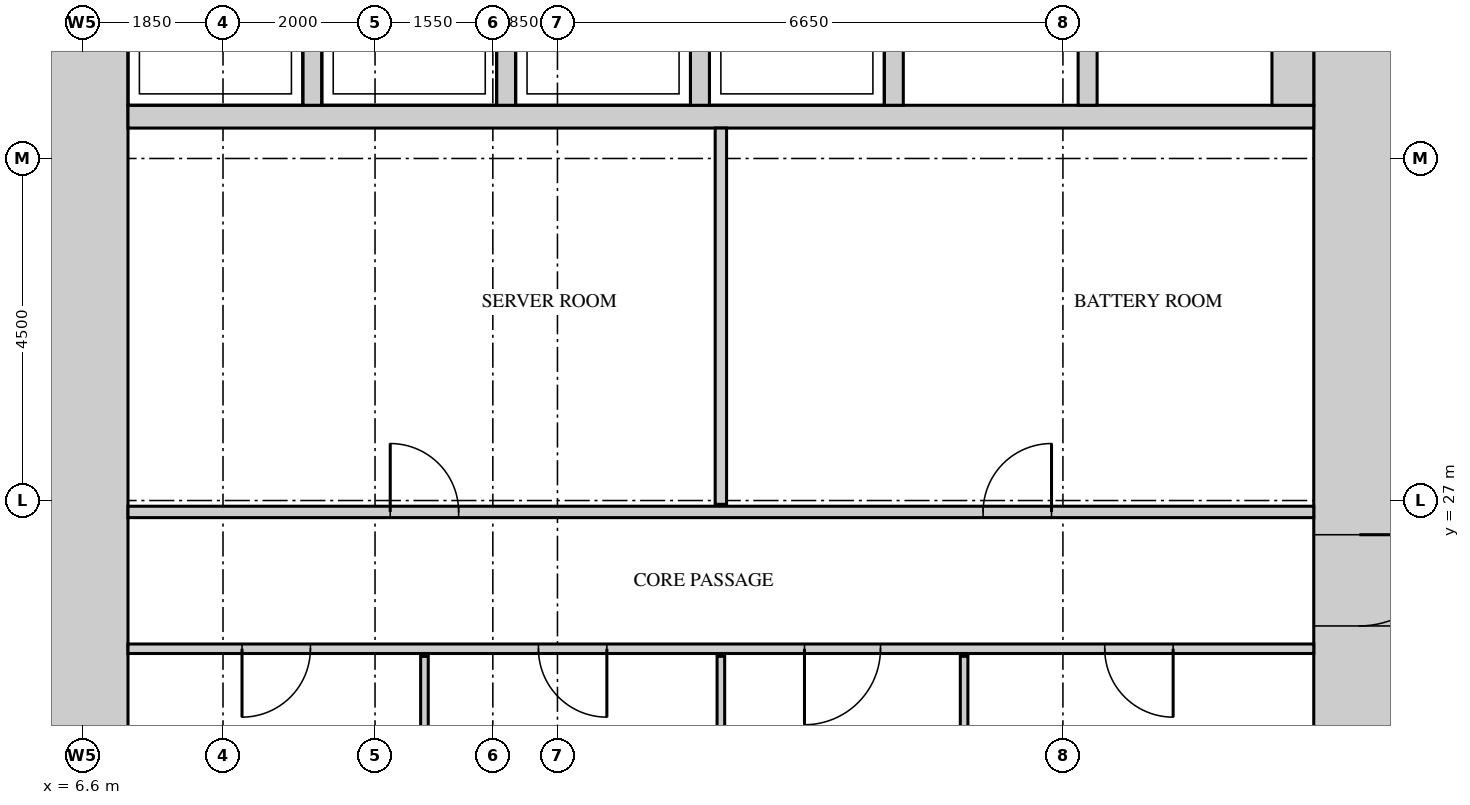
"""IFC4 building model, lengths in metres.
Left out: names, types, materials, properties, quantities, classifications, styles, units other than length and angle.
Written with IfcOpenShell. Run it as: python <this file> out.ifc"""

import sys

from ifc_helpers import new_model, si_unit, direction, frame, frame_2d, origin, place, context, subcontext, project, spatial, rectangle, extrude, source, transform, mapped, element, fill, save


model = new_model("IFC4")
c1 = context("Model", 3, precision=1e-05, world=origin(), true_north=direction((0.0, 1.0)))
c2 = subcontext(c1, "Body", "Model", "MODEL_VIEW")
j1 = project(units=[si_unit("LENGTHUNIT", "METRE"), si_unit("PLANEANGLEUNIT", "RADIAN")], contexts=[c1])
p1 = place(None, origin())
s1 = spatial("IfcSite", under=j1, at=p1, CompositionType="ELEMENT")
p2 = place(p1, origin())
s2 = spatial("IfcBuilding", under=s1, at=p2, CompositionType="ELEMENT")
p3 = place(p2, frame((0.0, 0.0, 69.0)))
s3 = spatial("IfcBuildingStorey", under=s2, at=p3, CompositionType="ELEMENT", Elevation=69.0)
m1 = source(origin(), c2, "Body", "SweptSolid", [
    extrude(rectangle(XDim=27.6, YDim=1.2, at=frame_2d((13.8, 0.0))), origin(), (0.0, 0.0, 1.0), 4.2),
])
p4 = place(p3, frame((23.4, 13.2, 0.0), z_axis=(0.0, 0.0, 1.0), x_axis=(0.0, 1.0, 0.0)))
e1 = element("IfcWall", 1, at=p4, inside=s3, PredefinedType="SHEAR", context=c2, shape_type="MappedRepresentation", body=[
    mapped(m1, transform((0.0, 0.0, 0.0))),
])
m2 = source(origin(), c2, "Body", "SweptSolid", [
    extrude(rectangle(XDim=1.8, YDim=2.1, at=frame_2d((0.9, 1.05))), frame((0.0, 0.61, 0.0), z_axis=(0.0, -1.0, 0.0), x_axis=(1.0, 0.0, 0.0)), (0.0, 0.0, 1.0), 1.22),
])
p5 = place(p4, frame((22.4, 0.0, 0.0)))
e2 = element("IfcOpeningElement", 2, at=p5, cuts=e1, PredefinedType="OPENING", context=c2, shape_type="MappedRepresentation", body=[
    mapped(m2, transform((0.0, 0.0, 0.0))),
])
m3 = source(origin(), c2, "Body", "SweptSolid", [
    extrude(rectangle(XDim=1.2, YDim=2.1, at=frame_2d((0.6, 1.05))), frame((0.0, 0.61, 0.0), z_axis=(0.0, -1.0, 0.0), x_axis=(1.0, 0.0, 0.0)), (0.0, 0.0, 1.0), 1.22),
])
p6 = place(p4, frame((12.15, 0.0, 0.0)))
e3 = element("IfcOpeningElement", 3, at=p6, cuts=e1, PredefinedType="OPENING", context=c2, shape_type="MappedRepresentation", body=[
    mapped(m3, transform((0.0, 0.0, 0.0))),
])
m4 = source(origin(), c2, "Body", "SweptSolid", [
    extrude(rectangle(XDim=0.9, YDim=2.1, at=frame_2d((0.45, 1.05))), frame((0.0, 0.61, 0.0), z_axis=(0.0, -1.0, 0.0), x_axis=(1.0, 0.0, 0.0)), (0.0, 0.0, 1.0), 1.22),
])
p7 = place(p4, frame((4.4, 0.0, 0.0)))
e4 = element("IfcOpeningElement", 4, at=p7, cuts=e1, PredefinedType="OPENING", context=c2, shape_type="MappedRepresentation", body=[
    mapped(m4, transform((0.0, 0.0, 0.0))),
])
p8 = place(p3, frame((6.6, 13.2, 0.0), z_axis=(0.0, 0.0, 1.0), x_axis=(0.0, 1.0, 0.0)))
e5 = element("IfcWall", 5, at=p8, inside=s3, PredefinedType="SHEAR", context=c2, shape_type="MappedRepresentation", body=[
    mapped(m1, transform((0.0, 0.0, 0.0))),
])
m5 = source(origin(), c2, "Body", "SweptSolid", [
    extrude(rectangle(XDim=15.6, YDim=0.3, at=frame_2d((7.8, 0.0))), origin(), (0.0, 0.0, 1.0), 4.2),
])
p9 = place(p3, frame((7.2, 32.05, 0.0), z_axis=(0.0, 0.0, 1.0), x_axis=(1.0, 0.0, 0.0)))
e6 = element("IfcWall", 6, at=p9, inside=s3, PredefinedType="STANDARD", context=c2, shape_type="MappedRepresentation", body=[
    mapped(m5, transform((0.0, 0.0, 0.0))),
])
m6 = source(origin(), c2, "Body", "SweptSolid", [
    extrude(rectangle(XDim=2.4, YDim=0.25, at=frame_2d((1.2, 0.0))), origin(), (0.0, 0.0, 1.0), 4.2),
])
for number, where, z_axis, x_axis in (
    (7, (9.625, 32.2, 0.0), (0.0, 0.0, 1.0), (0.0, 1.0, 0.0)),
    (8, (12.175, 32.2, 0.0), (0.0, 0.0, 1.0), (0.0, 1.0, 0.0)),
    (9, (14.725, 32.2, 0.0), (0.0, 0.0, 1.0), (0.0, 1.0, 0.0)),
    (10, (17.275, 32.2, 0.0), (0.0, 0.0, 1.0), (0.0, 1.0, 0.0)),
    (11, (19.825, 32.2, 0.0), (0.0, 0.0, 1.0), (0.0, 1.0, 0.0)),
):
    element("IfcWall", number, at=place(p3, frame(where, z_axis=z_axis, x_axis=x_axis)), inside=s3, PredefinedType="STANDARD", context=c2, shape_type="MappedRepresentation", body=[
        mapped(m6, transform((0.0, 0.0, 0.0))),
    ])
m7 = source(origin(), c2, "Body", "SweptSolid", [
    extrude(rectangle(XDim=2.4, YDim=0.55, at=frame_2d((1.2, 0.0))), origin(), (0.0, 0.0, 1.0), 4.2),
])
p10 = place(p3, frame((22.525, 32.2, 0.0), z_axis=(0.0, 0.0, 1.0), x_axis=(0.0, 1.0, 0.0)))
e12 = element("IfcWall", 12, at=p10, inside=s3, PredefinedType="STANDARD", context=c2, shape_type="MappedRepresentation", body=[
    mapped(m7, transform((0.0, 0.0, 0.0))),
])
m8 = source(origin(), c2, "Body", "SweptSolid", [
    extrude(rectangle(XDim=2.05, YDim=0.1, at=frame_2d((1.025, 0.0))), origin(), (0.0, 0.0, 1.0), 4.3),
])
for number, where, z_axis, x_axis in (
    (13, (11.1, 22.9, 0.0), (0.0, 0.0, 1.0), (0.0, 1.0, 0.0)),
    (14, (15.0, 22.9, 0.0), (0.0, 0.0, 1.0), (0.0, 1.0, 0.0)),
):
    element("IfcWall", number, at=place(p3, frame(where, z_axis=z_axis, x_axis=x_axis)), inside=s3, PredefinedType="PARTITIONING", context=c2, shape_type="MappedRepresentation", body=[
        mapped(m8, transform((0.0, 0.0, 0.0))),
    ])
m9 = source(origin(), c2, "Body", "SweptSolid", [
    extrude(rectangle(XDim=2.0, YDim=0.1, at=frame_2d((1.0, 0.0))), origin(), (0.0, 0.0, 1.0), 4.3),
])
p11 = place(p3, frame((18.2, 22.95, 0.0), z_axis=(0.0, 0.0, 1.0), x_axis=(0.0, 1.0, 0.0)))
e15 = element("IfcWall", 15, at=p11, inside=s3, PredefinedType="PARTITIONING", context=c2, shape_type="MappedRepresentation", body=[
    mapped(m9, transform((0.0, 0.0, 0.0))),
])
m10 = source(origin(), c2, "Body", "SweptSolid", [
    extrude(rectangle(XDim=15.6, YDim=0.125, at=frame_2d((7.8, 0.0))), origin(), (0.0, 0.0, 1.0), 4.3),
])
p12 = place(p3, frame((7.2, 25.05, 0.0), z_axis=(0.0, 0.0, 1.0), x_axis=(1.0, 0.0, 0.0)))
e16 = element("IfcWall", 16, at=p12, inside=s3, PredefinedType="PARTITIONING", context=c2, shape_type="MappedRepresentation", body=[
    mapped(m10, transform((0.0, 0.0, 0.0))),
])
m11 = source(origin(), c2, "Body", "SweptSolid", [
    extrude(rectangle(XDim=0.9, YDim=2.1, at=frame_2d((0.45, 1.05))), frame((0.0, 0.073, 0.0), z_axis=(0.0, -1.0, 0.0), x_axis=(1.0, 0.0, 0.0)), (0.0, 0.0, 1.0), 0.145),
])
p13 = place(p12, frame((1.5, 0.0, 0.0)))
e17 = element("IfcOpeningElement", 17, at=p13, cuts=e16, PredefinedType="OPENING", context=c2, shape_type="MappedRepresentation", body=[
    mapped(m11, transform((0.0, 0.0, 0.0))),
])
p14 = place(p12, frame((5.4, 0.0, 0.0)))
e18 = element("IfcOpeningElement", 18, at=p14, cuts=e16, PredefinedType="OPENING", context=c2, shape_type="MappedRepresentation", body=[
    mapped(m11, transform((0.0, 0.0, 0.0))),
])
m12 = source(origin(), c2, "Body", "SweptSolid", [
    extrude(rectangle(XDim=1.0, YDim=2.1, at=frame_2d((0.5, 1.05))), frame((0.0, 0.073, 0.0), z_axis=(0.0, -1.0, 0.0), x_axis=(1.0, 0.0, 0.0)), (0.0, 0.0, 1.0), 0.145),
])
p15 = place(p12, frame((8.9, 0.0, 0.0)))
e19 = element("IfcOpeningElement", 19, at=p15, cuts=e16, PredefinedType="OPENING", context=c2, shape_type="MappedRepresentation", body=[
    mapped(m12, transform((0.0, 0.0, 0.0))),
])
p16 = place(p12, frame((12.85, 0.0, 0.0)))
e20 = element("IfcOpeningElement", 20, at=p16, cuts=e16, PredefinedType="OPENING", context=c2, shape_type="MappedRepresentation", body=[
    mapped(m11, transform((0.0, 0.0, 0.0))),
])
m13 = source(origin(), c2, "Body", "SweptSolid", [
    extrude(rectangle(XDim=15.6, YDim=0.15, at=frame_2d((7.8, 0.0))), origin(), (0.0, 0.0, 1.0), 4.3),
])
p17 = place(p3, frame((7.2, 26.85, 0.0), z_axis=(0.0, 0.0, 1.0), x_axis=(1.0, 0.0, 0.0)))
e21 = element("IfcWall", 21, at=p17, inside=s3, PredefinedType="PARTITIONING", context=c2, shape_type="MappedRepresentation", body=[
    mapped(m13, transform((0.0, 0.0, 0.0))),
])
m14 = source(origin(), c2, "Body", "SweptSolid", [
    extrude(rectangle(XDim=0.9, YDim=2.1, at=frame_2d((0.45, 1.05))), frame((0.0, 0.085, 0.0), z_axis=(0.0, -1.0, 0.0), x_axis=(1.0, 0.0, 0.0)), (0.0, 0.0, 1.0), 0.17),
])
p18 = place(p17, frame((3.45, 0.0, 0.0)))
e22 = element("IfcOpeningElement", 22, at=p18, cuts=e21, PredefinedType="OPENING", context=c2, shape_type="MappedRepresentation", body=[
    mapped(m14, transform((0.0, 0.0, 0.0))),
])
p19 = place(p17, frame((11.25, 0.0, 0.0)))
e23 = element("IfcOpeningElement", 23, at=p19, cuts=e21, PredefinedType="OPENING", context=c2, shape_type="MappedRepresentation", body=[
    mapped(m14, transform((0.0, 0.0, 0.0))),
])
m15 = source(origin(), c2, "Body", "SweptSolid", [
    extrude(rectangle(XDim=4.95, YDim=0.15, at=frame_2d((2.475, 0.0))), origin(), (0.0, 0.0, 1.0), 4.3),
])
p20 = place(p3, frame((15.0, 26.95, 0.0), z_axis=(0.0, 0.0, 1.0), x_axis=(0.0, 1.0, 0.0)))
e24 = element("IfcWall", 24, at=p20, inside=s3, PredefinedType="PARTITIONING", context=c2, shape_type="MappedRepresentation", body=[
    mapped(m15, transform((0.0, 0.0, 0.0))),
])
m16 = source(origin(), c2, "Body", "SweptSolid", [
    extrude(rectangle(XDim=1.2, YDim=2.1, at=frame_2d((0.6, 1.05))), frame((0.0, 0.55, 0.0), z_axis=(0.0, -1.0, 0.0), x_axis=(1.0, 0.0, 0.0)), (0.0, 0.0, 1.0), 1.1),
])
p21 = place(p6, origin())
e25 = element("IfcDoor", 25, at=p21, inside=s3, OperationType="SINGLE_SWING_RIGHT", PredefinedType="DOOR", context=c2, shape_type="MappedRepresentation", body=[
    mapped(m16, transform((0.0, 0.0, 0.0))),
])
fill(e3, e25)
m17 = source(origin(), c2, "Body", "SweptSolid", [
    extrude(rectangle(XDim=0.9, YDim=2.1, at=frame_2d((0.45, 1.05))), frame((0.0, 0.025, 0.0), z_axis=(0.0, -1.0, 0.0), x_axis=(1.0, 0.0, 0.0)), (0.0, 0.0, 1.0), 0.05),
])
p22 = place(p18, origin())
e26 = element("IfcDoor", 26, at=p22, inside=s3, OperationType="SINGLE_SWING_RIGHT", PredefinedType="DOOR", context=c2, shape_type="MappedRepresentation", body=[
    mapped(m17, transform((0.0, 0.0, 0.0))),
])
fill(e22, e26)
p23 = place(p19, origin())
e27 = element("IfcDoor", 27, at=p23, inside=s3, OperationType="SINGLE_SWING_LEFT", PredefinedType="DOOR", context=c2, shape_type="MappedRepresentation", body=[
    mapped(m17, transform((0.0, 0.0, 0.0))),
])
fill(e23, e27)
p24 = place(p13, origin())
e28 = element("IfcDoor", 28, at=p24, inside=s3, OperationType="SINGLE_SWING_LEFT", PredefinedType="DOOR", context=c2, shape_type="MappedRepresentation", body=[
    mapped(m17, transform((0.0, 0.0, 0.0))),
])
fill(e17, e28)
p25 = place(p14, origin())
e29 = element("IfcDoor", 29, at=p25, inside=s3, OperationType="SINGLE_SWING_RIGHT", PredefinedType="DOOR", context=c2, shape_type="MappedRepresentation", body=[
    mapped(m17, transform((0.0, 0.0, 0.0))),
])
fill(e18, e29)
m18 = source(origin(), c2, "Body", "SweptSolid", [
    extrude(rectangle(XDim=1.0, YDim=2.1, at=frame_2d((0.5, 1.05))), frame((0.0, 0.025, 0.0), z_axis=(0.0, -1.0, 0.0), x_axis=(1.0, 0.0, 0.0)), (0.0, 0.0, 1.0), 0.05),
])
p26 = place(p15, origin())
e30 = element("IfcDoor", 30, at=p26, inside=s3, OperationType="SINGLE_SWING_LEFT", PredefinedType="DOOR", context=c2, shape_type="MappedRepresentation", body=[
    mapped(m18, transform((0.0, 0.0, 0.0))),
])
fill(e19, e30)
p27 = place(p16, origin())
e31 = element("IfcDoor", 31, at=p27, inside=s3, OperationType="SINGLE_SWING_RIGHT", PredefinedType="DOOR", context=c2, shape_type="MappedRepresentation", body=[
    mapped(m17, transform((0.0, 0.0, 0.0))),
])
fill(e20, e31)
save(model, sys.argv[1])
